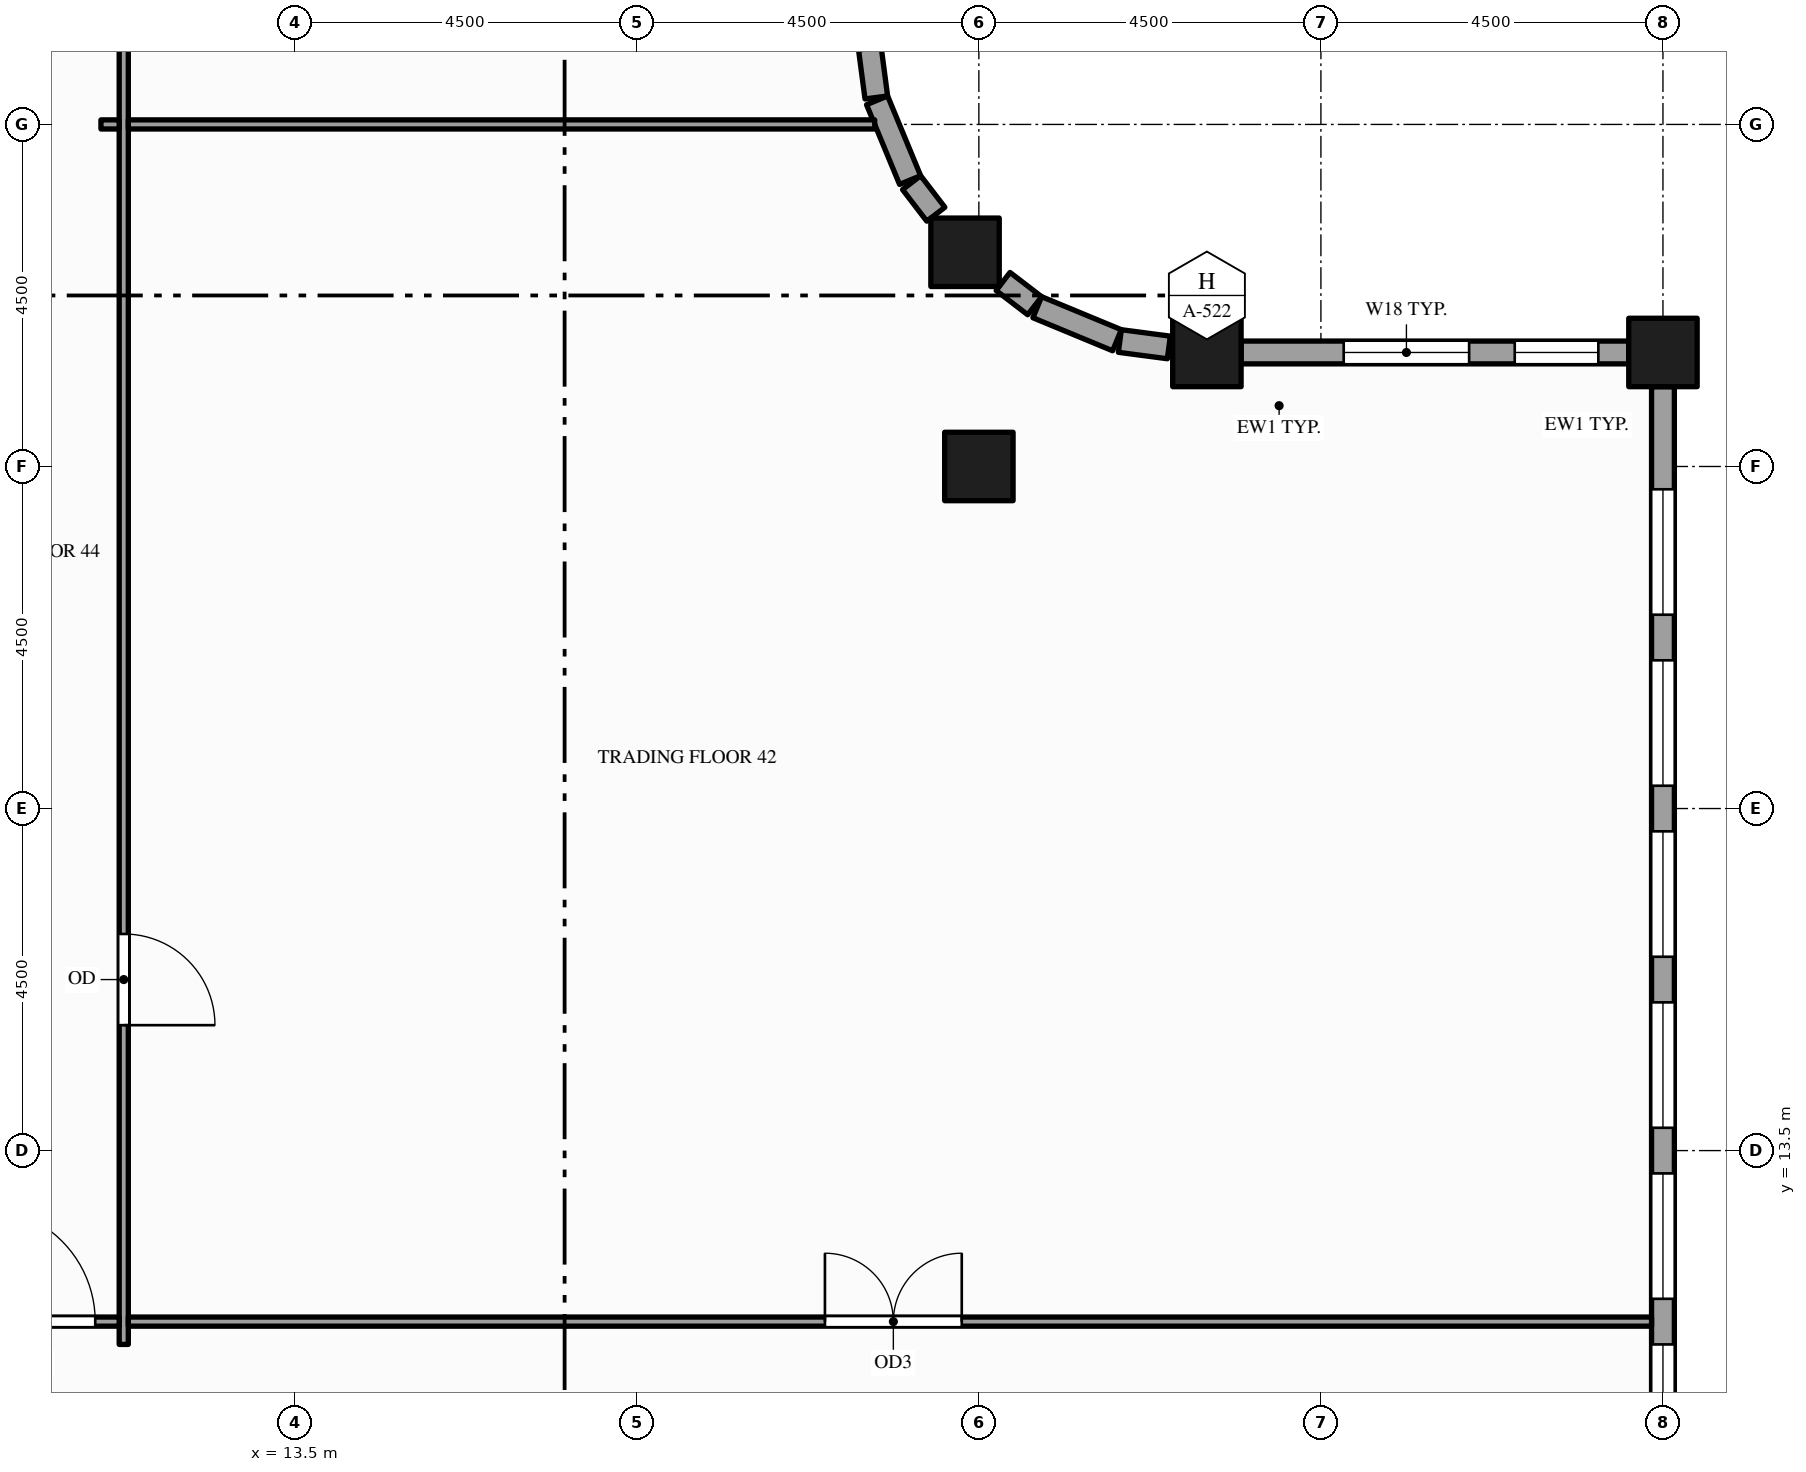
"""IFC4 building model, lengths in metres.
Left out: names, types, materials, properties, quantities, classifications, styles, units other than length and angle.
Written with IfcOpenShell. Run it as: python <this file> out.ifc"""

import sys

from ifc_helpers import new_model, si_unit, direction, frame, frame_2d, origin, origin_2d, place, context, subcontext, project, spatial, rectangle, hollow_rectangle, extrude, element, fill, save


model = new_model("IFC4")
c1 = context("Model", 3, precision=1e-05, world=origin(), true_north=direction((0.0, 1.0)))
c2 = subcontext(c1, "Body", "Model", "MODEL_VIEW")
j1 = project(units=[si_unit("LENGTHUNIT", "METRE"), si_unit("PLANEANGLEUNIT", "RADIAN")], contexts=[c1])
p1 = place(None, origin())
s1 = spatial("IfcSite", under=j1, at=p1, CompositionType="ELEMENT")
p2 = place(p1, origin())
s2 = spatial("IfcBuilding", under=s1, at=p2, CompositionType="ELEMENT")
p3 = place(p2, frame((0.0, 0.0, 139.0)))
s3 = spatial("IfcBuildingStorey", under=s2, at=p3, CompositionType="ELEMENT", Elevation=139.0)
for number, where, z_axis, x_axis in (
    (1, (22.318, 25.318, -0.15), (0.0, 0.0, 1.0), (1.0, 0.0, 0.0)),
    (2, (22.5, 22.5, -0.15), (0.0, 0.0, 1.0), (1.0, 0.0, 0.0)),
    (3, (25.5, 24.0, -0.15), (0.0, 0.0, 1.0), (1.0, 0.0, 0.0)),
    (4, (31.5, 24.0, -0.15), (0.0, 0.0, 1.0), (1.0, 0.0, 0.0)),
):
    element("IfcColumn", number, at=place(p3, frame(where, z_axis=z_axis, x_axis=x_axis)), inside=s3, PredefinedType="COLUMN", context=c2, shape_type="SweptSolid", body=[
        extrude(hollow_rectangle(XDim=0.9, YDim=0.9, WallThickness=0.045, at=origin_2d()), origin(), (0.0, 0.0, 1.0), 4.0),
    ])
p4 = place(p3, frame((31.05, 24.0, 0.0), z_axis=(0.0, 0.0, 1.0), x_axis=(-1.0, 0.0, 0.0)))
e5 = element("IfcWall", 5, at=p4, inside=s3, PredefinedType="STANDARD", context=c2, shape_type="SweptSolid", body=[
    extrude(rectangle(XDim=5.1, YDim=0.3, at=frame_2d((2.55, 0.0))), origin(), (0.0, 0.0, 1.0), 2.87),
])
p5 = place(p4, frame((0.4, 0.0, 0.9)))
e6 = element("IfcOpeningElement", 6, at=p5, cuts=e5, PredefinedType="OPENING", context=c2, shape_type="SweptSolid", body=[
    extrude(rectangle(XDim=1.1, YDim=1.75, at=frame_2d((0.55, 0.875))), frame((0.0, 0.16, 0.0), z_axis=(0.0, -1.0, 0.0), x_axis=(1.0, 0.0, 0.0)), (0.0, 0.0, 1.0), 0.32),
])
p6 = place(p4, frame((2.1, 0.0, 0.9)))
e7 = element("IfcOpeningElement", 7, at=p6, cuts=e5, PredefinedType="OPENING", context=c2, shape_type="SweptSolid", body=[
    extrude(rectangle(XDim=1.65, YDim=1.75, at=frame_2d((0.825, 0.875))), frame((0.0, 0.16, 0.0), z_axis=(0.0, -1.0, 0.0), x_axis=(1.0, 0.0, 0.0)), (0.0, 0.0, 1.0), 0.32),
])
p7 = place(p3, frame((25.0, 24.066, 0.0), z_axis=(0.0, 0.0, 1.0), x_axis=(-0.991423590996, 0.130687655177, 0.0)))
e8 = element("IfcWall", 8, at=p7, inside=s3, PredefinedType="STANDARD", context=c2, shape_type="SweptSolid", body=[
    extrude(rectangle(XDim=0.65, YDim=0.3, at=frame_2d((0.325, 0.0))), origin(), (0.0, 0.0, 1.0), 2.87),
])
p8 = place(p3, frame((24.317, 24.161, 0.0), z_axis=(0.0, 0.0, 1.0), x_axis=(-0.923914616768, 0.382598720491, 0.0)))
e9 = element("IfcWall", 9, at=p8, inside=s3, PredefinedType="STANDARD", context=c2, shape_type="SweptSolid", body=[
    extrude(rectangle(XDim=1.135, YDim=0.3, at=frame_2d((0.568, 0.0))), origin(), (0.0, 0.0, 1.0), 3.149),
])
for number, where, z_axis, x_axis in (
    (10, (23.234, 24.615, 0.0), (0.0, 0.0, 1.0), (-0.794, 0.609, 0.0)),
    (11, (21.934, 25.819, 0.0), (0.0, 0.0, 1.0), (-0.609, 0.794, 0.0)),
):
    element("IfcWall", number, at=place(p3, frame(where, z_axis=z_axis, x_axis=x_axis)), inside=s3, PredefinedType="STANDARD", context=c2, shape_type="SweptSolid", body=[
        extrude(rectangle(XDim=0.524, YDim=0.3, at=frame_2d((0.262, 0.0))), origin(), (0.0, 0.0, 1.0), 3.149),
    ])
p9 = place(p3, frame((21.595, 26.268, 0.0), z_axis=(0.0, 0.0, 1.0), x_axis=(-0.382598720491, 0.923914616768, 0.0)))
e12 = element("IfcWall", 12, at=p9, inside=s3, PredefinedType="STANDARD", context=c2, shape_type="SweptSolid", body=[
    extrude(rectangle(XDim=1.135, YDim=0.3, at=frame_2d((0.568, 0.0))), origin(), (0.0, 0.0, 1.0), 3.149),
])
p10 = place(p3, frame((21.151, 27.355, 0.0), z_axis=(0.0, 0.0, 1.0), x_axis=(-0.130687655177, 0.991423590996, 0.0)))
e13 = element("IfcWall", 13, at=p10, inside=s3, PredefinedType="STANDARD", context=c2, shape_type="SweptSolid", body=[
    extrude(rectangle(XDim=0.65, YDim=0.3, at=frame_2d((0.325, 0.0))), origin(), (0.0, 0.0, 1.0), 3.149),
])
p11 = place(p3, frame((31.5, 1.95, 0.0), z_axis=(0.0, 0.0, 1.0), x_axis=(0.0, 1.0, 0.0)))
e14 = element("IfcWall", 14, at=p11, inside=s3, PredefinedType="STANDARD", context=c2, shape_type="SweptSolid", body=[
    extrude(rectangle(XDim=21.6, YDim=0.3, at=frame_2d((10.8, 0.0))), origin(), (0.0, 0.0, 1.0), 3.149),
])
p12 = place(p11, frame((0.6, 0.0, 0.9)))
e15 = element("IfcOpeningElement", 15, at=p12, cuts=e14, PredefinedType="OPENING", context=c2, shape_type="SweptSolid", body=[
    extrude(rectangle(XDim=1.65, YDim=2.0, at=frame_2d((0.825, 1.0))), frame((0.0, 0.16, 0.0), z_axis=(0.0, -1.0, 0.0), x_axis=(1.0, 0.0, 0.0)), (0.0, 0.0, 1.0), 0.32),
])
p13 = place(p11, frame((2.85, 0.0, 0.9)))
e16 = element("IfcOpeningElement", 16, at=p13, cuts=e14, PredefinedType="OPENING", context=c2, shape_type="SweptSolid", body=[
    extrude(rectangle(XDim=1.65, YDim=2.0, at=frame_2d((0.825, 1.0))), frame((0.0, 0.16, 0.0), z_axis=(0.0, -1.0, 0.0), x_axis=(1.0, 0.0, 0.0)), (0.0, 0.0, 1.0), 0.32),
])
p14 = place(p11, frame((5.1, 0.0, 0.9)))
e17 = element("IfcOpeningElement", 17, at=p14, cuts=e14, PredefinedType="OPENING", context=c2, shape_type="SweptSolid", body=[
    extrude(rectangle(XDim=1.65, YDim=2.0, at=frame_2d((0.825, 1.0))), frame((0.0, 0.16, 0.0), z_axis=(0.0, -1.0, 0.0), x_axis=(1.0, 0.0, 0.0)), (0.0, 0.0, 1.0), 0.32),
])
p15 = place(p11, frame((7.35, 0.0, 0.9)))
e18 = element("IfcOpeningElement", 18, at=p15, cuts=e14, PredefinedType="OPENING", context=c2, shape_type="SweptSolid", body=[
    extrude(rectangle(XDim=1.65, YDim=2.0, at=frame_2d((0.825, 1.0))), frame((0.0, 0.16, 0.0), z_axis=(0.0, -1.0, 0.0), x_axis=(1.0, 0.0, 0.0)), (0.0, 0.0, 1.0), 0.32),
])
p16 = place(p11, frame((9.6, 0.0, 0.9)))
e19 = element("IfcOpeningElement", 19, at=p16, cuts=e14, PredefinedType="OPENING", context=c2, shape_type="SweptSolid", body=[
    extrude(rectangle(XDim=1.65, YDim=2.0, at=frame_2d((0.825, 1.0))), frame((0.0, 0.16, 0.0), z_axis=(0.0, -1.0, 0.0), x_axis=(1.0, 0.0, 0.0)), (0.0, 0.0, 1.0), 0.32),
])
p17 = place(p11, frame((11.85, 0.0, 0.9)))
e20 = element("IfcOpeningElement", 20, at=p17, cuts=e14, PredefinedType="OPENING", context=c2, shape_type="SweptSolid", body=[
    extrude(rectangle(XDim=1.65, YDim=2.0, at=frame_2d((0.825, 1.0))), frame((0.0, 0.16, 0.0), z_axis=(0.0, -1.0, 0.0), x_axis=(1.0, 0.0, 0.0)), (0.0, 0.0, 1.0), 0.32),
])
p18 = place(p11, frame((14.1, 0.0, 0.9)))
e21 = element("IfcOpeningElement", 21, at=p18, cuts=e14, PredefinedType="OPENING", context=c2, shape_type="SweptSolid", body=[
    extrude(rectangle(XDim=1.65, YDim=2.0, at=frame_2d((0.825, 1.0))), frame((0.0, 0.16, 0.0), z_axis=(0.0, -1.0, 0.0), x_axis=(1.0, 0.0, 0.0)), (0.0, 0.0, 1.0), 0.32),
])
p19 = place(p11, frame((16.35, 0.0, 0.9)))
e22 = element("IfcOpeningElement", 22, at=p19, cuts=e14, PredefinedType="OPENING", context=c2, shape_type="SweptSolid", body=[
    extrude(rectangle(XDim=1.65, YDim=2.0, at=frame_2d((0.825, 1.0))), frame((0.0, 0.16, 0.0), z_axis=(0.0, -1.0, 0.0), x_axis=(1.0, 0.0, 0.0)), (0.0, 0.0, 1.0), 0.32),
])
p20 = place(p11, frame((18.6, 0.0, 0.9)))
e23 = element("IfcOpeningElement", 23, at=p20, cuts=e14, PredefinedType="OPENING", context=c2, shape_type="SweptSolid", body=[
    extrude(rectangle(XDim=1.65, YDim=2.0, at=frame_2d((0.825, 1.0))), frame((0.0, 0.16, 0.0), z_axis=(0.0, -1.0, 0.0), x_axis=(1.0, 0.0, 0.0)), (0.0, 0.0, 1.0), 0.32),
])
p21 = place(p3, frame((11.25, 10.95, 0.0), z_axis=(0.0, 0.0, 1.0), x_axis=(0.0, 1.0, 0.0)))
e24 = element("IfcWall", 24, at=p21, inside=s3, PredefinedType="PARTITIONING", context=c2, shape_type="SweptSolid", body=[
    extrude(rectangle(XDim=20.85, YDim=0.12, at=frame_2d((10.425, 0.0))), origin(), (0.0, 0.0, 1.0), 2.6),
])
p22 = place(p21, frame((17.8, 0.0, 0.0)))
e25 = element("IfcOpeningElement", 25, at=p22, cuts=e24, PredefinedType="OPENING", context=c2, shape_type="SweptSolid", body=[
    extrude(rectangle(XDim=1.0, YDim=2.1, at=frame_2d((0.5, 1.05))), frame((0.0, 0.07, 0.0), z_axis=(0.0, -1.0, 0.0), x_axis=(1.0, 0.0, 0.0)), (0.0, 0.0, 1.0), 0.14),
])
p23 = place(p21, frame((4.2, 0.0, 0.0)))
e26 = element("IfcOpeningElement", 26, at=p23, cuts=e24, PredefinedType="OPENING", context=c2, shape_type="SweptSolid", body=[
    extrude(rectangle(XDim=1.2, YDim=2.1, at=frame_2d((0.6, 1.05))), frame((0.0, 0.07, 0.0), z_axis=(0.0, -1.0, 0.0), x_axis=(1.0, 0.0, 0.0)), (0.0, 0.0, 1.0), 0.14),
])
p24 = place(p3, frame((9.06, 11.25, 0.0), z_axis=(0.0, 0.0, 1.0), x_axis=(1.0, 0.0, 0.0)))
e27 = element("IfcWall", 27, at=p24, inside=s3, PredefinedType="PARTITIONING", context=c2, shape_type="SweptSolid", body=[
    extrude(rectangle(XDim=2.13, YDim=0.12, at=frame_2d((1.065, 0.0))), origin(), (0.0, 0.0, 1.0), 2.87),
])
p25 = place(p24, frame((0.315, 0.0, 0.0)))
e28 = element("IfcOpeningElement", 28, at=p25, cuts=e27, PredefinedType="OPENING", context=c2, shape_type="SweptSolid", body=[
    extrude(rectangle(XDim=1.5, YDim=2.1, at=frame_2d((0.75, 1.05))), frame((0.0, 0.07, 0.0), z_axis=(0.0, -1.0, 0.0), x_axis=(1.0, 0.0, 0.0)), (0.0, 0.0, 1.0), 0.14),
])
p26 = place(p3, frame((11.31, 11.25, 0.0), z_axis=(0.0, 0.0, 1.0), x_axis=(1.0, 0.0, 0.0)))
e29 = element("IfcWall", 29, at=p26, inside=s3, PredefinedType="PARTITIONING", context=c2, shape_type="SweptSolid", body=[
    extrude(rectangle(XDim=20.04, YDim=0.12, at=frame_2d((10.02, 0.0))), origin(), (0.0, 0.0, 1.0), 2.87),
])
p27 = place(p26, frame((9.165, 0.0, 0.0)))
e30 = element("IfcOpeningElement", 30, at=p27, cuts=e29, PredefinedType="OPENING", context=c2, shape_type="SweptSolid", body=[
    extrude(rectangle(XDim=1.8, YDim=2.1, at=frame_2d((0.9, 1.05))), frame((0.0, 0.07, 0.0), z_axis=(0.0, -1.0, 0.0), x_axis=(1.0, 0.0, 0.0)), (0.0, 0.0, 1.0), 0.14),
])
p28 = place(p3, frame((10.95, 27.0, 0.0), z_axis=(0.0, 0.0, 1.0), x_axis=(1.0, 0.0, 0.0)))
e31 = element("IfcWall", 31, at=p28, inside=s3, PredefinedType="PARTITIONING", context=c2, shape_type="SweptSolid", body=[
    extrude(rectangle(XDim=0.24, YDim=0.12, at=frame_2d((0.12, 0.0))), origin(), (0.0, 0.0, 1.0), 2.87),
])
p29 = place(p3, frame((11.31, 27.0, 0.0), z_axis=(0.0, 0.0, 1.0), x_axis=(1.0, 0.0, 0.0)))
e32 = element("IfcWall", 32, at=p29, inside=s3, PredefinedType="PARTITIONING", context=c2, shape_type="SweptSolid", body=[
    extrude(rectangle(XDim=9.82, YDim=0.12, at=frame_2d((4.91, 0.0))), origin(), (0.0, 0.0, 1.0), 2.87),
])
p30 = place(p5, origin())
e33 = element("IfcWindow", 33, at=p30, inside=s3, PartitioningType="SINGLE_PANEL", PredefinedType="WINDOW", context=c2, shape_type="SweptSolid", body=[
    extrude(rectangle(XDim=1.1, YDim=1.75, at=frame_2d((0.55, 0.875))), frame((0.0, 0.03, 0.0), z_axis=(0.0, -1.0, 0.0), x_axis=(1.0, 0.0, 0.0)), (0.0, 0.0, 1.0), 0.06),
])
fill(e6, e33)
p31 = place(p6, origin())
e34 = element("IfcWindow", 34, at=p31, inside=s3, PartitioningType="SINGLE_PANEL", PredefinedType="WINDOW", context=c2, shape_type="SweptSolid", body=[
    extrude(rectangle(XDim=1.65, YDim=1.75, at=frame_2d((0.825, 0.875))), frame((0.0, 0.03, 0.0), z_axis=(0.0, -1.0, 0.0), x_axis=(1.0, 0.0, 0.0)), (0.0, 0.0, 1.0), 0.06),
])
fill(e7, e34)
p32 = place(p15, origin())
e35 = element("IfcWindow", 35, at=p32, inside=s3, PartitioningType="SINGLE_PANEL", PredefinedType="WINDOW", context=c2, shape_type="SweptSolid", body=[
    extrude(rectangle(XDim=1.65, YDim=2.0, at=frame_2d((0.825, 1.0))), frame((0.0, 0.03, 0.0), z_axis=(0.0, -1.0, 0.0), x_axis=(1.0, 0.0, 0.0)), (0.0, 0.0, 1.0), 0.06),
])
fill(e18, e35)
p33 = place(p16, origin())
e36 = element("IfcWindow", 36, at=p33, inside=s3, PartitioningType="SINGLE_PANEL", PredefinedType="WINDOW", context=c2, shape_type="SweptSolid", body=[
    extrude(rectangle(XDim=1.65, YDim=2.0, at=frame_2d((0.825, 1.0))), frame((0.0, 0.03, 0.0), z_axis=(0.0, -1.0, 0.0), x_axis=(1.0, 0.0, 0.0)), (0.0, 0.0, 1.0), 0.06),
])
fill(e19, e36)
p34 = place(p17, origin())
e37 = element("IfcWindow", 37, at=p34, inside=s3, PartitioningType="SINGLE_PANEL", PredefinedType="WINDOW", context=c2, shape_type="SweptSolid", body=[
    extrude(rectangle(XDim=1.65, YDim=2.0, at=frame_2d((0.825, 1.0))), frame((0.0, 0.03, 0.0), z_axis=(0.0, -1.0, 0.0), x_axis=(1.0, 0.0, 0.0)), (0.0, 0.0, 1.0), 0.06),
])
fill(e20, e37)
p35 = place(p18, origin())
e38 = element("IfcWindow", 38, at=p35, inside=s3, PartitioningType="SINGLE_PANEL", PredefinedType="WINDOW", context=c2, shape_type="SweptSolid", body=[
    extrude(rectangle(XDim=1.65, YDim=2.0, at=frame_2d((0.825, 1.0))), frame((0.0, 0.03, 0.0), z_axis=(0.0, -1.0, 0.0), x_axis=(1.0, 0.0, 0.0)), (0.0, 0.0, 1.0), 0.06),
])
fill(e21, e38)
p36 = place(p19, origin())
e39 = element("IfcWindow", 39, at=p36, inside=s3, PartitioningType="SINGLE_PANEL", PredefinedType="WINDOW", context=c2, shape_type="SweptSolid", body=[
    extrude(rectangle(XDim=1.65, YDim=2.0, at=frame_2d((0.825, 1.0))), frame((0.0, 0.03, 0.0), z_axis=(0.0, -1.0, 0.0), x_axis=(1.0, 0.0, 0.0)), (0.0, 0.0, 1.0), 0.06),
])
fill(e22, e39)
p37 = place(p20, origin())
e40 = element("IfcWindow", 40, at=p37, inside=s3, PartitioningType="SINGLE_PANEL", PredefinedType="WINDOW", context=c2, shape_type="SweptSolid", body=[
    extrude(rectangle(XDim=1.65, YDim=2.0, at=frame_2d((0.825, 1.0))), frame((0.0, 0.03, 0.0), z_axis=(0.0, -1.0, 0.0), x_axis=(1.0, 0.0, 0.0)), (0.0, 0.0, 1.0), 0.06),
])
fill(e23, e40)
p38 = place(p27, origin())
e41 = element("IfcDoor", 41, at=p38, inside=s3, OperationType="DOUBLE_DOOR_SINGLE_SWING", PredefinedType="DOOR", context=c2, shape_type="SweptSolid", body=[
    extrude(rectangle(XDim=1.8, YDim=2.1, at=frame_2d((0.9, 1.05))), frame((0.0, 0.025, 0.0), z_axis=(0.0, -1.0, 0.0), x_axis=(1.0, 0.0, 0.0)), (0.0, 0.0, 1.0), 0.05),
])
fill(e30, e41)
p39 = place(p25, origin())
e42 = element("IfcDoor", 42, at=p39, inside=s3, OperationType="SINGLE_SWING_LEFT", PredefinedType="DOOR", context=c2, shape_type="SweptSolid", body=[
    extrude(rectangle(XDim=1.5, YDim=2.1, at=frame_2d((0.75, 1.05))), frame((0.0, 0.025, 0.0), z_axis=(0.0, -1.0, 0.0), x_axis=(1.0, 0.0, 0.0)), (0.0, 0.0, 1.0), 0.05),
])
fill(e28, e42)
p40 = place(p23, origin())
e43 = element("IfcDoor", 43, at=p40, inside=s3, OperationType="SINGLE_SWING_LEFT", PredefinedType="DOOR", context=c2, shape_type="SweptSolid", body=[
    extrude(rectangle(XDim=1.2, YDim=2.1, at=frame_2d((0.6, 1.05))), frame((0.0, 0.025, 0.0), z_axis=(0.0, -1.0, 0.0), x_axis=(1.0, 0.0, 0.0)), (0.0, 0.0, 1.0), 0.05),
])
fill(e26, e43)
save(model, sys.argv[1])
